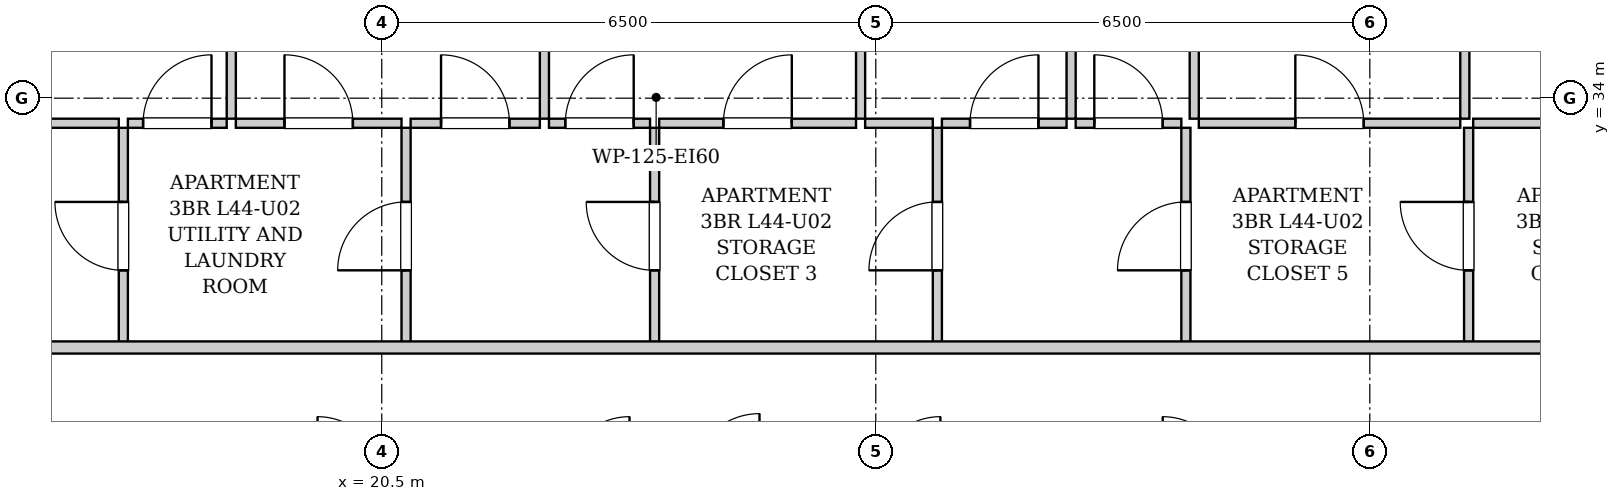
"""IFC4 building model, lengths in metres.
Left out: names, types, materials, properties, quantities, classifications, styles, units other than length and angle.
Written with IfcOpenShell. Run it as: python <this file> out.ifc"""

import sys

from ifc_helpers import new_model, si_unit, direction, frame, frame_2d, origin, place, context, subcontext, project, spatial, rectangle, extrude, element, fill, save


model = new_model("IFC4")
c1 = context("Model", 3, precision=1e-05, world=origin(), true_north=direction((0.0, 1.0)))
c2 = subcontext(c1, "Body", "Model", "MODEL_VIEW")
j1 = project(units=[si_unit("LENGTHUNIT", "METRE"), si_unit("PLANEANGLEUNIT", "RADIAN")], contexts=[c1])
p1 = place(None, origin())
s1 = spatial("IfcSite", under=j1, at=p1, CompositionType="ELEMENT")
p2 = place(p1, origin())
s2 = spatial("IfcBuilding", under=s1, at=p2, CompositionType="ELEMENT")
p3 = place(p2, frame((0.0, 0.0, 153.65)))
s3 = spatial("IfcBuildingStorey", under=s2, at=p3, CompositionType="ELEMENT", Elevation=153.65)
p4 = place(p3, frame((17.1, 30.76, 0.0), z_axis=(0.0, 0.0, 1.0), x_axis=(0.0, 1.0, 0.0)))
e1 = element("IfcWall", 1, at=p4, inside=s3, PredefinedType="PARTITIONING", context=c2, shape_type="SweptSolid", body=[
    extrude(rectangle(XDim=2.85, YDim=0.12, at=frame_2d((1.425, 0.0))), origin(), (0.0, 0.0, 1.0), 2.99),
])
p5 = place(p4, frame((0.975, 0.0, 0.0)))
e2 = element("IfcOpeningElement", 2, at=p5, cuts=e1, PredefinedType="OPENING", context=c2, shape_type="SweptSolid", body=[
    extrude(rectangle(XDim=0.9, YDim=2.05, at=frame_2d((0.45, 1.025))), frame((0.0, 0.07, 0.0), z_axis=(0.0, -1.0, 0.0), x_axis=(1.0, 0.0, 0.0)), (0.0, 0.0, 1.0), 0.14),
])
p6 = place(p3, frame((14.26, 33.67, 0.0), z_axis=(0.0, 0.0, 1.0), x_axis=(1.0, 0.0, 0.0)))
e3 = element("IfcWall", 3, at=p6, inside=s3, PredefinedType="PARTITIONING", context=c2, shape_type="SweptSolid", body=[
    extrude(rectangle(XDim=2.78, YDim=0.12, at=frame_2d((1.39, 0.0))), origin(), (0.0, 0.0, 1.0), 2.99),
])
p7 = place(p6, frame((0.94, 0.0, 0.0)))
e4 = element("IfcOpeningElement", 4, at=p7, cuts=e3, PredefinedType="OPENING", context=c2, shape_type="SweptSolid", body=[
    extrude(rectangle(XDim=0.9, YDim=2.05, at=frame_2d((0.45, 1.025))), frame((0.0, 0.07, 0.0), z_axis=(0.0, -1.0, 0.0), x_axis=(1.0, 0.0, 0.0)), (0.0, 0.0, 1.0), 0.14),
])
p8 = place(p3, frame((20.82, 30.76, 0.0), z_axis=(0.0, 0.0, 1.0), x_axis=(0.0, 1.0, 0.0)))
e5 = element("IfcWall", 5, at=p8, inside=s3, PredefinedType="PARTITIONING", context=c2, shape_type="SweptSolid", body=[
    extrude(rectangle(XDim=2.85, YDim=0.12, at=frame_2d((1.425, 0.0))), origin(), (0.0, 0.0, 1.0), 2.99),
])
p9 = place(p8, frame((0.975, 0.0, 0.0)))
e6 = element("IfcOpeningElement", 6, at=p9, cuts=e5, PredefinedType="OPENING", context=c2, shape_type="SweptSolid", body=[
    extrude(rectangle(XDim=0.9, YDim=2.05, at=frame_2d((0.45, 1.025))), frame((0.0, 0.07, 0.0), z_axis=(0.0, -1.0, 0.0), x_axis=(1.0, 0.0, 0.0)), (0.0, 0.0, 1.0), 0.14),
])
p10 = place(p3, frame((17.16, 33.67, 0.0), z_axis=(0.0, 0.0, 1.0), x_axis=(1.0, 0.0, 0.0)))
e7 = element("IfcWall", 7, at=p10, inside=s3, PredefinedType="PARTITIONING", context=c2, shape_type="SweptSolid", body=[
    extrude(rectangle(XDim=1.3, YDim=0.12, at=frame_2d((0.65, 0.0))), origin(), (0.0, 0.0, 1.0), 2.99),
])
p11 = place(p10, frame((0.2, 0.0, 0.0)))
e8 = element("IfcOpeningElement", 8, at=p11, cuts=e7, PredefinedType="OPENING", context=c2, shape_type="SweptSolid", body=[
    extrude(rectangle(XDim=0.9, YDim=2.05, at=frame_2d((0.45, 1.025))), frame((0.0, 0.07, 0.0), z_axis=(0.0, -1.0, 0.0), x_axis=(1.0, 0.0, 0.0)), (0.0, 0.0, 1.0), 0.14),
])
p12 = place(p3, frame((18.58, 33.67, 0.0), z_axis=(0.0, 0.0, 1.0), x_axis=(1.0, 0.0, 0.0)))
e9 = element("IfcWall", 9, at=p12, inside=s3, PredefinedType="PARTITIONING", context=c2, shape_type="SweptSolid", body=[
    extrude(rectangle(XDim=2.18, YDim=0.12, at=frame_2d((1.09, 0.0))), origin(), (0.0, 0.0, 1.0), 2.99),
])
p13 = place(p12, frame((0.64, 0.0, 0.0)))
e10 = element("IfcOpeningElement", 10, at=p13, cuts=e9, PredefinedType="OPENING", context=c2, shape_type="SweptSolid", body=[
    extrude(rectangle(XDim=0.9, YDim=2.05, at=frame_2d((0.45, 1.025))), frame((0.0, 0.07, 0.0), z_axis=(0.0, -1.0, 0.0), x_axis=(1.0, 0.0, 0.0)), (0.0, 0.0, 1.0), 0.14),
])
p14 = place(p3, frame((24.09, 30.76, 0.0), z_axis=(0.0, 0.0, 1.0), x_axis=(0.0, 1.0, 0.0)))
e11 = element("IfcWall", 11, at=p14, inside=s3, PredefinedType="PARTITIONING", context=c2, shape_type="SweptSolid", body=[
    extrude(rectangle(XDim=2.85, YDim=0.12, at=frame_2d((1.425, 0.0))), origin(), (0.0, 0.0, 1.0), 2.99),
])
p15 = place(p14, frame((0.975, 0.0, 0.0)))
e12 = element("IfcOpeningElement", 12, at=p15, cuts=e11, PredefinedType="OPENING", context=c2, shape_type="SweptSolid", body=[
    extrude(rectangle(XDim=0.9, YDim=2.05, at=frame_2d((0.45, 1.025))), frame((0.0, 0.07, 0.0), z_axis=(0.0, -1.0, 0.0), x_axis=(1.0, 0.0, 0.0)), (0.0, 0.0, 1.0), 0.14),
])
p16 = place(p3, frame((20.88, 33.67, 0.0), z_axis=(0.0, 0.0, 1.0), x_axis=(1.0, 0.0, 0.0)))
e13 = element("IfcWall", 13, at=p16, inside=s3, PredefinedType="PARTITIONING", context=c2, shape_type="SweptSolid", body=[
    extrude(rectangle(XDim=1.7, YDim=0.12, at=frame_2d((0.85, 0.0))), origin(), (0.0, 0.0, 1.0), 2.99),
])
p17 = place(p16, frame((0.4, 0.0, 0.0)))
e14 = element("IfcOpeningElement", 14, at=p17, cuts=e13, PredefinedType="OPENING", context=c2, shape_type="SweptSolid", body=[
    extrude(rectangle(XDim=0.9, YDim=2.05, at=frame_2d((0.45, 1.025))), frame((0.0, 0.07, 0.0), z_axis=(0.0, -1.0, 0.0), x_axis=(1.0, 0.0, 0.0)), (0.0, 0.0, 1.0), 0.14),
])
p18 = place(p3, frame((22.7, 33.67, 0.0), z_axis=(0.0, 0.0, 1.0), x_axis=(1.0, 0.0, 0.0)))
e15 = element("IfcWall", 15, at=p18, inside=s3, PredefinedType="PARTITIONING", context=c2, shape_type="SweptSolid", body=[
    extrude(rectangle(XDim=1.33, YDim=0.12, at=frame_2d((0.665, 0.0))), origin(), (0.0, 0.0, 1.0), 2.99),
])
p19 = place(p18, frame((0.215, 0.0, 0.0)))
e16 = element("IfcOpeningElement", 16, at=p19, cuts=e15, PredefinedType="OPENING", context=c2, shape_type="SweptSolid", body=[
    extrude(rectangle(XDim=0.9, YDim=2.05, at=frame_2d((0.45, 1.025))), frame((0.0, 0.07, 0.0), z_axis=(0.0, -1.0, 0.0), x_axis=(1.0, 0.0, 0.0)), (0.0, 0.0, 1.0), 0.14),
])
p20 = place(p3, frame((27.81, 30.76, 0.0), z_axis=(0.0, 0.0, 1.0), x_axis=(0.0, 1.0, 0.0)))
e17 = element("IfcWall", 17, at=p20, inside=s3, PredefinedType="PARTITIONING", context=c2, shape_type="SweptSolid", body=[
    extrude(rectangle(XDim=2.85, YDim=0.12, at=frame_2d((1.425, 0.0))), origin(), (0.0, 0.0, 1.0), 2.99),
])
p21 = place(p20, frame((0.975, 0.0, 0.0)))
e18 = element("IfcOpeningElement", 18, at=p21, cuts=e17, PredefinedType="OPENING", context=c2, shape_type="SweptSolid", body=[
    extrude(rectangle(XDim=0.9, YDim=2.05, at=frame_2d((0.45, 1.025))), frame((0.0, 0.07, 0.0), z_axis=(0.0, -1.0, 0.0), x_axis=(1.0, 0.0, 0.0)), (0.0, 0.0, 1.0), 0.14),
])
p22 = place(p3, frame((24.15, 33.67, 0.0), z_axis=(0.0, 0.0, 1.0), x_axis=(1.0, 0.0, 0.0)))
e19 = element("IfcWall", 19, at=p22, inside=s3, PredefinedType="PARTITIONING", context=c2, shape_type="SweptSolid", body=[
    extrude(rectangle(XDim=2.59, YDim=0.12, at=frame_2d((1.295, 0.0))), origin(), (0.0, 0.0, 1.0), 2.99),
])
p23 = place(p22, frame((0.845, 0.0, 0.0)))
e20 = element("IfcOpeningElement", 20, at=p23, cuts=e19, PredefinedType="OPENING", context=c2, shape_type="SweptSolid", body=[
    extrude(rectangle(XDim=0.9, YDim=2.05, at=frame_2d((0.45, 1.025))), frame((0.0, 0.07, 0.0), z_axis=(0.0, -1.0, 0.0), x_axis=(1.0, 0.0, 0.0)), (0.0, 0.0, 1.0), 0.14),
])
p24 = place(p3, frame((26.86, 33.67, 0.0), z_axis=(0.0, 0.0, 1.0), x_axis=(1.0, 0.0, 0.0)))
e21 = element("IfcWall", 21, at=p24, inside=s3, PredefinedType="PARTITIONING", context=c2, shape_type="SweptSolid", body=[
    extrude(rectangle(XDim=0.89, YDim=0.12, at=frame_2d((0.445, 0.0))), origin(), (0.0, 0.0, 1.0), 2.99),
])
p25 = place(p3, frame((31.08, 30.76, 0.0), z_axis=(0.0, 0.0, 1.0), x_axis=(0.0, 1.0, 0.0)))
e22 = element("IfcWall", 22, at=p25, inside=s3, PredefinedType="PARTITIONING", context=c2, shape_type="SweptSolid", body=[
    extrude(rectangle(XDim=2.85, YDim=0.12, at=frame_2d((1.425, 0.0))), origin(), (0.0, 0.0, 1.0), 2.99),
])
p26 = place(p25, frame((0.975, 0.0, 0.0)))
e23 = element("IfcOpeningElement", 23, at=p26, cuts=e22, PredefinedType="OPENING", context=c2, shape_type="SweptSolid", body=[
    extrude(rectangle(XDim=0.9, YDim=2.05, at=frame_2d((0.45, 1.025))), frame((0.0, 0.07, 0.0), z_axis=(0.0, -1.0, 0.0), x_axis=(1.0, 0.0, 0.0)), (0.0, 0.0, 1.0), 0.14),
])
p27 = place(p3, frame((27.87, 33.67, 0.0), z_axis=(0.0, 0.0, 1.0), x_axis=(1.0, 0.0, 0.0)))
e24 = element("IfcWall", 24, at=p27, inside=s3, PredefinedType="PARTITIONING", context=c2, shape_type="SweptSolid", body=[
    extrude(rectangle(XDim=1.64, YDim=0.12, at=frame_2d((0.82, 0.0))), origin(), (0.0, 0.0, 1.0), 2.99),
])
p28 = place(p27, frame((0.37, 0.0, 0.0)))
e25 = element("IfcOpeningElement", 25, at=p28, cuts=e24, PredefinedType="OPENING", context=c2, shape_type="SweptSolid", body=[
    extrude(rectangle(XDim=0.9, YDim=2.05, at=frame_2d((0.45, 1.025))), frame((0.0, 0.07, 0.0), z_axis=(0.0, -1.0, 0.0), x_axis=(1.0, 0.0, 0.0)), (0.0, 0.0, 1.0), 0.14),
])
p29 = place(p3, frame((29.63, 33.67, 0.0), z_axis=(0.0, 0.0, 1.0), x_axis=(1.0, 0.0, 0.0)))
e26 = element("IfcWall", 26, at=p29, inside=s3, PredefinedType="PARTITIONING", context=c2, shape_type="SweptSolid", body=[
    extrude(rectangle(XDim=1.39, YDim=0.12, at=frame_2d((0.695, 0.0))), origin(), (0.0, 0.0, 1.0), 2.99),
])
p30 = place(p29, frame((0.245, 0.0, 0.0)))
e27 = element("IfcOpeningElement", 27, at=p30, cuts=e26, PredefinedType="OPENING", context=c2, shape_type="SweptSolid", body=[
    extrude(rectangle(XDim=0.9, YDim=2.05, at=frame_2d((0.45, 1.025))), frame((0.0, 0.07, 0.0), z_axis=(0.0, -1.0, 0.0), x_axis=(1.0, 0.0, 0.0)), (0.0, 0.0, 1.0), 0.14),
])
p31 = place(p3, frame((34.8, 30.76, 0.0), z_axis=(0.0, 0.0, 1.0), x_axis=(0.0, 1.0, 0.0)))
e28 = element("IfcWall", 28, at=p31, inside=s3, PredefinedType="PARTITIONING", context=c2, shape_type="SweptSolid", body=[
    extrude(rectangle(XDim=2.85, YDim=0.12, at=frame_2d((1.425, 0.0))), origin(), (0.0, 0.0, 1.0), 2.99),
])
p32 = place(p31, frame((0.975, 0.0, 0.0)))
e29 = element("IfcOpeningElement", 29, at=p32, cuts=e28, PredefinedType="OPENING", context=c2, shape_type="SweptSolid", body=[
    extrude(rectangle(XDim=0.9, YDim=2.05, at=frame_2d((0.45, 1.025))), frame((0.0, 0.07, 0.0), z_axis=(0.0, -1.0, 0.0), x_axis=(1.0, 0.0, 0.0)), (0.0, 0.0, 1.0), 0.14),
])
p33 = place(p3, frame((31.25, 33.67, 0.0), z_axis=(0.0, 0.0, 1.0), x_axis=(1.0, 0.0, 0.0)))
e30 = element("IfcWall", 30, at=p33, inside=s3, PredefinedType="PARTITIONING", context=c2, shape_type="SweptSolid", body=[
    extrude(rectangle(XDim=3.44, YDim=0.12, at=frame_2d((1.72, 0.0))), origin(), (0.0, 0.0, 1.0), 2.99),
])
p34 = place(p33, frame((1.27, 0.0, 0.0)))
e31 = element("IfcOpeningElement", 31, at=p34, cuts=e30, PredefinedType="OPENING", context=c2, shape_type="SweptSolid", body=[
    extrude(rectangle(XDim=0.9, YDim=2.05, at=frame_2d((0.45, 1.025))), frame((0.0, 0.07, 0.0), z_axis=(0.0, -1.0, 0.0), x_axis=(1.0, 0.0, 0.0)), (0.0, 0.0, 1.0), 0.14),
])
p35 = place(p3, frame((34.86, 33.67, 0.0), z_axis=(0.0, 0.0, 1.0), x_axis=(1.0, 0.0, 0.0)))
e32 = element("IfcWall", 32, at=p35, inside=s3, PredefinedType="PARTITIONING", context=c2, shape_type="SweptSolid", body=[
    extrude(rectangle(XDim=2.86, YDim=0.12, at=frame_2d((1.43, 0.0))), origin(), (0.0, 0.0, 1.0), 2.99),
])
p36 = place(p35, frame((0.98, 0.0, 0.0)))
e33 = element("IfcOpeningElement", 33, at=p36, cuts=e32, PredefinedType="OPENING", context=c2, shape_type="SweptSolid", body=[
    extrude(rectangle(XDim=0.9, YDim=2.05, at=frame_2d((0.45, 1.025))), frame((0.0, 0.07, 0.0), z_axis=(0.0, -1.0, 0.0), x_axis=(1.0, 0.0, 0.0)), (0.0, 0.0, 1.0), 0.14),
])
p37 = place(p3, frame((18.52, 33.73, 0.0), z_axis=(0.0, 0.0, 1.0), x_axis=(0.0, 1.0, 0.0)))
e34 = element("IfcWall", 34, at=p37, inside=s3, PredefinedType="PARTITIONING", context=c2, shape_type="SweptSolid", body=[
    extrude(rectangle(XDim=9.29, YDim=0.12, at=frame_2d((4.645, 0.0))), origin(), (0.0, 0.0, 1.0), 2.99),
])
p38 = place(p37, frame((4.18, 0.0, 0.0)))
e35 = element("IfcOpeningElement", 35, at=p38, cuts=e34, PredefinedType="OPENING", context=c2, shape_type="SweptSolid", body=[
    extrude(rectangle(XDim=0.9, YDim=2.05, at=frame_2d((0.45, 1.025))), frame((0.0, 0.07, 0.0), z_axis=(0.0, -1.0, 0.0), x_axis=(1.0, 0.0, 0.0)), (0.0, 0.0, 1.0), 0.14),
])
p39 = place(p3, frame((22.64, 33.73, 0.0), z_axis=(0.0, 0.0, 1.0), x_axis=(0.0, 1.0, 0.0)))
e36 = element("IfcWall", 36, at=p39, inside=s3, PredefinedType="PARTITIONING", context=c2, shape_type="SweptSolid", body=[
    extrude(rectangle(XDim=9.29, YDim=0.12, at=frame_2d((4.645, 0.0))), origin(), (0.0, 0.0, 1.0), 2.99),
])
p40 = place(p39, frame((4.18, 0.0, 0.0)))
e37 = element("IfcOpeningElement", 37, at=p40, cuts=e36, PredefinedType="OPENING", context=c2, shape_type="SweptSolid", body=[
    extrude(rectangle(XDim=0.9, YDim=2.05, at=frame_2d((0.45, 1.025))), frame((0.0, 0.07, 0.0), z_axis=(0.0, -1.0, 0.0), x_axis=(1.0, 0.0, 0.0)), (0.0, 0.0, 1.0), 0.14),
])
p41 = place(p3, frame((26.8, 33.73, 0.0), z_axis=(0.0, 0.0, 1.0), x_axis=(0.0, 1.0, 0.0)))
e38 = element("IfcWall", 38, at=p41, inside=s3, PredefinedType="PARTITIONING", context=c2, shape_type="SweptSolid", body=[
    extrude(rectangle(XDim=9.29, YDim=0.12, at=frame_2d((4.645, 0.0))), origin(), (0.0, 0.0, 1.0), 2.99),
])
p42 = place(p41, frame((4.18, 0.0, 0.0)))
e39 = element("IfcOpeningElement", 39, at=p42, cuts=e38, PredefinedType="OPENING", context=c2, shape_type="SweptSolid", body=[
    extrude(rectangle(XDim=0.9, YDim=2.05, at=frame_2d((0.45, 1.025))), frame((0.0, 0.07, 0.0), z_axis=(0.0, -1.0, 0.0), x_axis=(1.0, 0.0, 0.0)), (0.0, 0.0, 1.0), 0.14),
])
p43 = place(p3, frame((29.57, 33.73, 0.0), z_axis=(0.0, 0.0, 1.0), x_axis=(0.0, 1.0, 0.0)))
e40 = element("IfcWall", 40, at=p43, inside=s3, PredefinedType="PARTITIONING", context=c2, shape_type="SweptSolid", body=[
    extrude(rectangle(XDim=9.29, YDim=0.12, at=frame_2d((4.645, 0.0))), origin(), (0.0, 0.0, 1.0), 2.99),
])
p44 = place(p43, frame((4.18, 0.0, 0.0)))
e41 = element("IfcOpeningElement", 41, at=p44, cuts=e40, PredefinedType="OPENING", context=c2, shape_type="SweptSolid", body=[
    extrude(rectangle(XDim=0.9, YDim=2.05, at=frame_2d((0.45, 1.025))), frame((0.0, 0.07, 0.0), z_axis=(0.0, -1.0, 0.0), x_axis=(1.0, 0.0, 0.0)), (0.0, 0.0, 1.0), 0.14),
])
p45 = place(p3, frame((31.19, 33.73, 0.0), z_axis=(0.0, 0.0, 1.0), x_axis=(0.0, 1.0, 0.0)))
e42 = element("IfcWall", 42, at=p45, inside=s3, PredefinedType="PARTITIONING", context=c2, shape_type="SweptSolid", body=[
    extrude(rectangle(XDim=7.14, YDim=0.12, at=frame_2d((3.57, 0.0))), origin(), (0.0, 0.0, 1.0), 2.99),
])
p46 = place(p45, frame((3.12, 0.0, 0.0)))
e43 = element("IfcOpeningElement", 43, at=p46, cuts=e42, PredefinedType="OPENING", context=c2, shape_type="SweptSolid", body=[
    extrude(rectangle(XDim=0.9, YDim=2.05, at=frame_2d((0.45, 1.025))), frame((0.0, 0.07, 0.0), z_axis=(0.0, -1.0, 0.0), x_axis=(1.0, 0.0, 0.0)), (0.0, 0.0, 1.0), 0.14),
])
p47 = place(p3, frame((34.75, 33.73, 0.0), z_axis=(0.0, 0.0, 1.0), x_axis=(0.0, 1.0, 0.0)))
e44 = element("IfcWall", 44, at=p47, inside=s3, PredefinedType="PARTITIONING", context=c2, shape_type="SweptSolid", body=[
    extrude(rectangle(XDim=7.14, YDim=0.12, at=frame_2d((3.57, 0.0))), origin(), (0.0, 0.0, 1.0), 2.99),
])
p48 = place(p47, frame((3.12, 0.0, 0.0)))
e45 = element("IfcOpeningElement", 45, at=p48, cuts=e44, PredefinedType="OPENING", context=c2, shape_type="SweptSolid", body=[
    extrude(rectangle(XDim=0.9, YDim=2.05, at=frame_2d((0.45, 1.025))), frame((0.0, 0.07, 0.0), z_axis=(0.0, -1.0, 0.0), x_axis=(1.0, 0.0, 0.0)), (0.0, 0.0, 1.0), 0.14),
])
p49 = place(p3, frame((10.05, 30.72, 0.0), z_axis=(0.0, 0.0, 1.0), x_axis=(1.0, 0.0, 0.0)))
e46 = element("IfcWall", 46, at=p49, inside=s3, PredefinedType="PARTITIONING", context=c2, shape_type="SweptSolid", body=[
    extrude(rectangle(XDim=27.7, YDim=0.16, at=frame_2d((13.85, 0.0))), origin(), (0.0, 0.0, 1.0), 2.99),
])
p50 = place(p49, frame((4.295, 0.0, 0.0)))
e47 = element("IfcOpeningElement", 47, at=p50, cuts=e46, PredefinedType="OPENING", context=c2, shape_type="SweptSolid", body=[
    extrude(rectangle(XDim=0.95, YDim=2.1, at=frame_2d((0.475, 1.05))), frame((0.0, 0.09, 0.0), z_axis=(0.0, -1.0, 0.0), x_axis=(1.0, 0.0, 0.0)), (0.0, 0.0, 1.0), 0.18),
])
p51 = place(p5, origin())
e48 = element("IfcDoor", 48, at=p51, inside=s3, OperationType="SINGLE_SWING_RIGHT", PredefinedType="DOOR", context=c2, shape_type="SweptSolid", body=[
    extrude(rectangle(XDim=0.9, YDim=2.05, at=frame_2d((0.45, 1.025))), frame((0.0, 0.025, 0.0), z_axis=(0.0, -1.0, 0.0), x_axis=(1.0, 0.0, 0.0)), (0.0, 0.0, 1.0), 0.05),
])
fill(e2, e48)
p52 = place(p9, origin())
e49 = element("IfcDoor", 49, at=p52, inside=s3, OperationType="SINGLE_SWING_LEFT", PredefinedType="DOOR", context=c2, shape_type="SweptSolid", body=[
    extrude(rectangle(XDim=0.9, YDim=2.05, at=frame_2d((0.45, 1.025))), frame((0.0, 0.025, 0.0), z_axis=(0.0, -1.0, 0.0), x_axis=(1.0, 0.0, 0.0)), (0.0, 0.0, 1.0), 0.05),
])
fill(e6, e49)
p53 = place(p11, origin())
e50 = element("IfcDoor", 50, at=p53, inside=s3, OperationType="SINGLE_SWING_RIGHT", PredefinedType="DOOR", context=c2, shape_type="SweptSolid", body=[
    extrude(rectangle(XDim=0.9, YDim=2.05, at=frame_2d((0.45, 1.025))), frame((0.0, 0.025, 0.0), z_axis=(0.0, -1.0, 0.0), x_axis=(1.0, 0.0, 0.0)), (0.0, 0.0, 1.0), 0.05),
])
fill(e8, e50)
p54 = place(p13, origin())
e51 = element("IfcDoor", 51, at=p54, inside=s3, OperationType="SINGLE_SWING_LEFT", PredefinedType="DOOR", context=c2, shape_type="SweptSolid", body=[
    extrude(rectangle(XDim=0.9, YDim=2.05, at=frame_2d((0.45, 1.025))), frame((0.0, 0.025, 0.0), z_axis=(0.0, -1.0, 0.0), x_axis=(1.0, 0.0, 0.0)), (0.0, 0.0, 1.0), 0.05),
])
fill(e10, e51)
p55 = place(p15, origin())
e52 = element("IfcDoor", 52, at=p55, inside=s3, OperationType="SINGLE_SWING_RIGHT", PredefinedType="DOOR", context=c2, shape_type="SweptSolid", body=[
    extrude(rectangle(XDim=0.9, YDim=2.05, at=frame_2d((0.45, 1.025))), frame((0.0, 0.025, 0.0), z_axis=(0.0, -1.0, 0.0), x_axis=(1.0, 0.0, 0.0)), (0.0, 0.0, 1.0), 0.05),
])
fill(e12, e52)
p56 = place(p17, origin())
e53 = element("IfcDoor", 53, at=p56, inside=s3, OperationType="SINGLE_SWING_LEFT", PredefinedType="DOOR", context=c2, shape_type="SweptSolid", body=[
    extrude(rectangle(XDim=0.9, YDim=2.05, at=frame_2d((0.45, 1.025))), frame((0.0, 0.025, 0.0), z_axis=(0.0, -1.0, 0.0), x_axis=(1.0, 0.0, 0.0)), (0.0, 0.0, 1.0), 0.05),
])
fill(e14, e53)
p57 = place(p19, origin())
e54 = element("IfcDoor", 54, at=p57, inside=s3, OperationType="SINGLE_SWING_RIGHT", PredefinedType="DOOR", context=c2, shape_type="SweptSolid", body=[
    extrude(rectangle(XDim=0.9, YDim=2.05, at=frame_2d((0.45, 1.025))), frame((0.0, 0.025, 0.0), z_axis=(0.0, -1.0, 0.0), x_axis=(1.0, 0.0, 0.0)), (0.0, 0.0, 1.0), 0.05),
])
fill(e16, e54)
p58 = place(p21, origin())
e55 = element("IfcDoor", 55, at=p58, inside=s3, OperationType="SINGLE_SWING_LEFT", PredefinedType="DOOR", context=c2, shape_type="SweptSolid", body=[
    extrude(rectangle(XDim=0.9, YDim=2.05, at=frame_2d((0.45, 1.025))), frame((0.0, 0.025, 0.0), z_axis=(0.0, -1.0, 0.0), x_axis=(1.0, 0.0, 0.0)), (0.0, 0.0, 1.0), 0.05),
])
fill(e18, e55)
p59 = place(p23, origin())
e56 = element("IfcDoor", 56, at=p59, inside=s3, OperationType="SINGLE_SWING_RIGHT", PredefinedType="DOOR", context=c2, shape_type="SweptSolid", body=[
    extrude(rectangle(XDim=0.9, YDim=2.05, at=frame_2d((0.45, 1.025))), frame((0.0, 0.025, 0.0), z_axis=(0.0, -1.0, 0.0), x_axis=(1.0, 0.0, 0.0)), (0.0, 0.0, 1.0), 0.05),
])
fill(e20, e56)
p60 = place(p26, origin())
e57 = element("IfcDoor", 57, at=p60, inside=s3, OperationType="SINGLE_SWING_LEFT", PredefinedType="DOOR", context=c2, shape_type="SweptSolid", body=[
    extrude(rectangle(XDim=0.9, YDim=2.05, at=frame_2d((0.45, 1.025))), frame((0.0, 0.025, 0.0), z_axis=(0.0, -1.0, 0.0), x_axis=(1.0, 0.0, 0.0)), (0.0, 0.0, 1.0), 0.05),
])
fill(e23, e57)
p61 = place(p28, origin())
e58 = element("IfcDoor", 58, at=p61, inside=s3, OperationType="SINGLE_SWING_RIGHT", PredefinedType="DOOR", context=c2, shape_type="SweptSolid", body=[
    extrude(rectangle(XDim=0.9, YDim=2.05, at=frame_2d((0.45, 1.025))), frame((0.0, 0.025, 0.0), z_axis=(0.0, -1.0, 0.0), x_axis=(1.0, 0.0, 0.0)), (0.0, 0.0, 1.0), 0.05),
])
fill(e25, e58)
p62 = place(p30, origin())
e59 = element("IfcDoor", 59, at=p62, inside=s3, OperationType="SINGLE_SWING_LEFT", PredefinedType="DOOR", context=c2, shape_type="SweptSolid", body=[
    extrude(rectangle(XDim=0.9, YDim=2.05, at=frame_2d((0.45, 1.025))), frame((0.0, 0.025, 0.0), z_axis=(0.0, -1.0, 0.0), x_axis=(1.0, 0.0, 0.0)), (0.0, 0.0, 1.0), 0.05),
])
fill(e27, e59)
p63 = place(p32, origin())
e60 = element("IfcDoor", 60, at=p63, inside=s3, OperationType="SINGLE_SWING_RIGHT", PredefinedType="DOOR", context=c2, shape_type="SweptSolid", body=[
    extrude(rectangle(XDim=0.9, YDim=2.05, at=frame_2d((0.45, 1.025))), frame((0.0, 0.025, 0.0), z_axis=(0.0, -1.0, 0.0), x_axis=(1.0, 0.0, 0.0)), (0.0, 0.0, 1.0), 0.05),
])
fill(e29, e60)
p64 = place(p34, origin())
e61 = element("IfcDoor", 61, at=p64, inside=s3, OperationType="SINGLE_SWING_LEFT", PredefinedType="DOOR", context=c2, shape_type="SweptSolid", body=[
    extrude(rectangle(XDim=0.9, YDim=2.05, at=frame_2d((0.45, 1.025))), frame((0.0, 0.025, 0.0), z_axis=(0.0, -1.0, 0.0), x_axis=(1.0, 0.0, 0.0)), (0.0, 0.0, 1.0), 0.05),
])
fill(e31, e61)
save(model, sys.argv[1])
